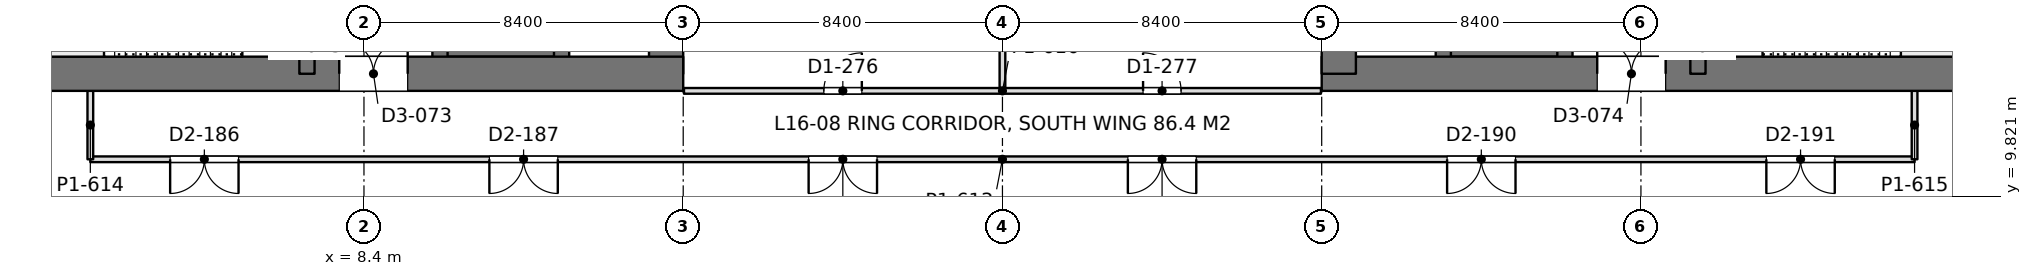
"""IFC4 building model, lengths in metres.
Left out: names, types, materials, properties, quantities, classifications, styles, units other than length and angle.
Written with IfcOpenShell. Run it as: python <this file> out.ifc"""

import sys

from ifc_helpers import new_model, si_unit, direction, frame, frame_2d, origin, place, context, subcontext, project, spatial, rectangle, extrude, element, fill, save


model = new_model("IFC4")
c1 = context("Model", 3, precision=1e-05, world=origin(), true_north=direction((0.0, 1.0)))
c2 = subcontext(c1, "Body", "Model", "MODEL_VIEW")
j1 = project(units=[si_unit("LENGTHUNIT", "METRE"), si_unit("PLANEANGLEUNIT", "RADIAN")], contexts=[c1])
p1 = place(None, origin())
s1 = spatial("IfcSite", under=j1, at=p1, CompositionType="ELEMENT")
p2 = place(p1, origin())
s2 = spatial("IfcBuilding", under=s1, at=p2, CompositionType="ELEMENT")
p3 = place(p2, frame((0.0, 0.0, 72.9)))
s3 = spatial("IfcBuildingStorey", under=s2, at=p3, CompositionType="ELEMENT", Elevation=72.9)
p4 = place(p3, frame((-1.2, 13.05, 0.0), z_axis=(0.0, 0.0, 1.0), x_axis=(1.0, 0.0, 0.0)))
e1 = element("IfcWall", 1, at=p4, inside=s3, PredefinedType="SHEAR", context=c2, shape_type="SweptSolid", body=[
    extrude(rectangle(XDim=18.0, YDim=0.9, at=frame_2d((9.0, 0.0))), origin(), (0.0, 0.0, 1.0), 4.5),
])
p5 = place(p4, frame((8.95, 0.0, 0.0)))
e2 = element("IfcOpeningElement", 2, at=p5, cuts=e1, PredefinedType="OPENING", context=c2, shape_type="SweptSolid", body=[
    extrude(rectangle(XDim=1.8, YDim=2.4, at=frame_2d((0.9, 1.2))), frame((0.0, 0.46, 0.0), z_axis=(0.0, -1.0, 0.0), x_axis=(1.0, 0.0, 0.0)), (0.0, 0.0, 1.0), 0.92),
])
p6 = place(p3, frame((16.35, 13.05, 0.0), z_axis=(0.0, 0.0, 1.0), x_axis=(0.0, 1.0, 0.0)))
e3 = element("IfcWall", 3, at=p6, inside=s3, PredefinedType="SHEAR", context=c2, shape_type="SweptSolid", body=[
    extrude(rectangle(XDim=24.3, YDim=0.9, at=frame_2d((12.15, 0.0))), origin(), (0.0, 0.0, 1.0), 4.5),
])
p7 = place(p3, frame((6.9, 13.05, 0.0), z_axis=(0.0, 0.0, 1.0), x_axis=(0.0, 1.0, 0.0)))
e4 = element("IfcWall", 4, at=p7, inside=s3, PredefinedType="SHEAR", context=c2, shape_type="SweptSolid", body=[
    extrude(rectangle(XDim=24.3, YDim=0.4, at=frame_2d((12.15, 0.0))), origin(), (0.0, 0.0, 1.0), 4.5),
])
p8 = place(p7, frame((1.3, 0.0, 0.0)))
e5 = element("IfcOpeningElement", 5, at=p8, cuts=e4, PredefinedType="OPENING", context=c2, shape_type="SweptSolid", body=[
    extrude(rectangle(XDim=1.0, YDim=2.2, at=frame_2d((0.5, 1.1))), frame((0.0, 0.21, 0.0), z_axis=(0.0, -1.0, 0.0), x_axis=(1.0, 0.0, 0.0)), (0.0, 0.0, 1.0), 0.42),
])
p9 = place(p7, frame((22.0, 0.0, 0.0)))
e6 = element("IfcOpeningElement", 6, at=p9, cuts=e4, PredefinedType="OPENING", context=c2, shape_type="SweptSolid", body=[
    extrude(rectangle(XDim=1.0, YDim=2.2, at=frame_2d((0.5, 1.1))), frame((0.0, 0.21, 0.0), z_axis=(0.0, -1.0, 0.0), x_axis=(1.0, 0.0, 0.0)), (0.0, 0.0, 1.0), 0.42),
])
p10 = place(p7, frame((5.55, 0.0, 0.0)))
e7 = element("IfcOpeningElement", 7, at=p10, cuts=e4, PredefinedType="OPENING", context=c2, shape_type="SweptSolid", body=[
    extrude(rectangle(XDim=1.0, YDim=2.2, at=frame_2d((0.5, 1.1))), frame((0.0, 0.21, 0.0), z_axis=(0.0, -1.0, 0.0), x_axis=(1.0, 0.0, 0.0)), (0.0, 0.0, 1.0), 0.42),
])
p11 = place(p7, frame((9.55, 0.0, 0.0)))
e8 = element("IfcOpeningElement", 8, at=p11, cuts=e4, PredefinedType="OPENING", context=c2, shape_type="SweptSolid", body=[
    extrude(rectangle(XDim=1.0, YDim=2.2, at=frame_2d((0.5, 1.1))), frame((0.0, 0.21, 0.0), z_axis=(0.0, -1.0, 0.0), x_axis=(1.0, 0.0, 0.0)), (0.0, 0.0, 1.0), 0.42),
])
p12 = place(p7, frame((12.8, 0.0, 0.0)))
e9 = element("IfcOpeningElement", 9, at=p12, cuts=e4, PredefinedType="OPENING", context=c2, shape_type="SweptSolid", body=[
    extrude(rectangle(XDim=1.1, YDim=2.2, at=frame_2d((0.55, 1.1))), frame((0.0, 0.21, 0.0), z_axis=(0.0, -1.0, 0.0), x_axis=(1.0, 0.0, 0.0)), (0.0, 0.0, 1.0), 0.42),
])
p13 = place(p7, frame((15.538, 0.0, 0.0)))
e10 = element("IfcOpeningElement", 10, at=p13, cuts=e4, PredefinedType="OPENING", context=c2, shape_type="SweptSolid", body=[
    extrude(rectangle(XDim=1.1, YDim=2.2, at=frame_2d((0.55, 1.1))), frame((0.0, 0.21, 0.0), z_axis=(0.0, -1.0, 0.0), x_axis=(1.0, 0.0, 0.0)), (0.0, 0.0, 1.0), 0.42),
])
p14 = place(p7, frame((18.262, 0.0, 0.0)))
e11 = element("IfcOpeningElement", 11, at=p14, cuts=e4, PredefinedType="OPENING", context=c2, shape_type="SweptSolid", body=[
    extrude(rectangle(XDim=1.1, YDim=2.2, at=frame_2d((0.55, 1.1))), frame((0.0, 0.21, 0.0), z_axis=(0.0, -1.0, 0.0), x_axis=(1.0, 0.0, 0.0)), (0.0, 0.0, 1.0), 0.42),
])
p15 = place(p3, frame((10.4, 13.05, 0.0), z_axis=(0.0, 0.0, 1.0), x_axis=(0.0, 1.0, 0.0)))
e12 = element("IfcWall", 12, at=p15, inside=s3, PredefinedType="SHEAR", context=c2, shape_type="SweptSolid", body=[
    extrude(rectangle(XDim=24.3, YDim=0.4, at=frame_2d((12.15, 0.0))), origin(), (0.0, 0.0, 1.0), 4.5),
])
p16 = place(p15, frame((1.5, 0.0, 0.0)))
e13 = element("IfcOpeningElement", 13, at=p16, cuts=e12, PredefinedType="OPENING", context=c2, shape_type="SweptSolid", body=[
    extrude(rectangle(XDim=1.1, YDim=2.2, at=frame_2d((0.55, 1.1))), frame((0.0, 0.21, 0.0), z_axis=(0.0, -1.0, 0.0), x_axis=(1.0, 0.0, 0.0)), (0.0, 0.0, 1.0), 0.42),
])
p17 = place(p15, frame((4.35, 0.0, 0.0)))
e14 = element("IfcOpeningElement", 14, at=p17, cuts=e12, PredefinedType="OPENING", context=c2, shape_type="SweptSolid", body=[
    extrude(rectangle(XDim=1.1, YDim=2.2, at=frame_2d((0.55, 1.1))), frame((0.0, 0.21, 0.0), z_axis=(0.0, -1.0, 0.0), x_axis=(1.0, 0.0, 0.0)), (0.0, 0.0, 1.0), 0.42),
])
p18 = place(p15, frame((7.2, 0.0, 0.0)))
e15 = element("IfcOpeningElement", 15, at=p18, cuts=e12, PredefinedType="OPENING", context=c2, shape_type="SweptSolid", body=[
    extrude(rectangle(XDim=1.1, YDim=2.2, at=frame_2d((0.55, 1.1))), frame((0.0, 0.21, 0.0), z_axis=(0.0, -1.0, 0.0), x_axis=(1.0, 0.0, 0.0)), (0.0, 0.0, 1.0), 0.42),
])
p19 = place(p15, frame((21.45, 0.0, 0.0)))
e16 = element("IfcOpeningElement", 16, at=p19, cuts=e12, PredefinedType="OPENING", context=c2, shape_type="SweptSolid", body=[
    extrude(rectangle(XDim=1.1, YDim=2.2, at=frame_2d((0.55, 1.1))), frame((0.0, 0.21, 0.0), z_axis=(0.0, -1.0, 0.0), x_axis=(1.0, 0.0, 0.0)), (0.0, 0.0, 1.0), 0.42),
])
p20 = place(p3, frame((13.6, 13.05, 0.0), z_axis=(0.0, 0.0, 1.0), x_axis=(0.0, 1.0, 0.0)))
e17 = element("IfcWall", 17, at=p20, inside=s3, PredefinedType="SHEAR", context=c2, shape_type="SweptSolid", body=[
    extrude(rectangle(XDim=24.3, YDim=0.4, at=frame_2d((12.15, 0.0))), origin(), (0.0, 0.0, 1.0), 4.5),
])
p21 = place(p3, frame((10.4, 13.65, 0.0), z_axis=(0.0, 0.0, 1.0), x_axis=(1.0, 0.0, 0.0)))
e18 = element("IfcWall", 18, at=p21, inside=s3, PredefinedType="SHEAR", context=c2, shape_type="SweptSolid", body=[
    extrude(rectangle(XDim=3.2, YDim=0.3, at=frame_2d((1.6, 0.0))), origin(), (0.0, 0.0, 1.0), 4.5),
])
p22 = place(p3, frame((33.6, 13.05, 0.0), z_axis=(0.0, 0.0, 1.0), x_axis=(1.0, 0.0, 0.0)))
e19 = element("IfcWall", 19, at=p22, inside=s3, PredefinedType="SHEAR", context=c2, shape_type="SweptSolid", body=[
    extrude(rectangle(XDim=18.0, YDim=0.9, at=frame_2d((9.0, 0.0))), origin(), (0.0, 0.0, 1.0), 4.5),
])
p23 = place(p22, frame((7.25, 0.0, 0.0)))
e20 = element("IfcOpeningElement", 20, at=p23, cuts=e19, PredefinedType="OPENING", context=c2, shape_type="SweptSolid", body=[
    extrude(rectangle(XDim=1.8, YDim=2.4, at=frame_2d((0.9, 1.2))), frame((0.0, 0.46, 0.0), z_axis=(0.0, -1.0, 0.0), x_axis=(1.0, 0.0, 0.0)), (0.0, 0.0, 1.0), 0.92),
])
p24 = place(p3, frame((34.05, 13.05, 0.0), z_axis=(0.0, 0.0, 1.0), x_axis=(0.0, 1.0, 0.0)))
e21 = element("IfcWall", 21, at=p24, inside=s3, PredefinedType="SHEAR", context=c2, shape_type="SweptSolid", body=[
    extrude(rectangle(XDim=24.3, YDim=0.9, at=frame_2d((12.15, 0.0))), origin(), (0.0, 0.0, 1.0), 4.5),
])
p25 = place(p3, frame((43.5, 13.05, 0.0), z_axis=(0.0, 0.0, 1.0), x_axis=(0.0, 1.0, 0.0)))
e22 = element("IfcWall", 22, at=p25, inside=s3, PredefinedType="SHEAR", context=c2, shape_type="SweptSolid", body=[
    extrude(rectangle(XDim=24.3, YDim=0.4, at=frame_2d((12.15, 0.0))), origin(), (0.0, 0.0, 1.0), 4.5),
])
p26 = place(p25, frame((1.3, 0.0, 0.0)))
e23 = element("IfcOpeningElement", 23, at=p26, cuts=e22, PredefinedType="OPENING", context=c2, shape_type="SweptSolid", body=[
    extrude(rectangle(XDim=1.0, YDim=2.2, at=frame_2d((0.5, 1.1))), frame((0.0, 0.21, 0.0), z_axis=(0.0, -1.0, 0.0), x_axis=(1.0, 0.0, 0.0)), (0.0, 0.0, 1.0), 0.42),
])
p27 = place(p25, frame((22.0, 0.0, 0.0)))
e24 = element("IfcOpeningElement", 24, at=p27, cuts=e22, PredefinedType="OPENING", context=c2, shape_type="SweptSolid", body=[
    extrude(rectangle(XDim=1.0, YDim=2.2, at=frame_2d((0.5, 1.1))), frame((0.0, 0.21, 0.0), z_axis=(0.0, -1.0, 0.0), x_axis=(1.0, 0.0, 0.0)), (0.0, 0.0, 1.0), 0.42),
])
p28 = place(p25, frame((5.55, 0.0, 0.0)))
e25 = element("IfcOpeningElement", 25, at=p28, cuts=e22, PredefinedType="OPENING", context=c2, shape_type="SweptSolid", body=[
    extrude(rectangle(XDim=1.0, YDim=2.2, at=frame_2d((0.5, 1.1))), frame((0.0, 0.21, 0.0), z_axis=(0.0, -1.0, 0.0), x_axis=(1.0, 0.0, 0.0)), (0.0, 0.0, 1.0), 0.42),
])
p29 = place(p25, frame((9.55, 0.0, 0.0)))
e26 = element("IfcOpeningElement", 26, at=p29, cuts=e22, PredefinedType="OPENING", context=c2, shape_type="SweptSolid", body=[
    extrude(rectangle(XDim=1.0, YDim=2.2, at=frame_2d((0.5, 1.1))), frame((0.0, 0.21, 0.0), z_axis=(0.0, -1.0, 0.0), x_axis=(1.0, 0.0, 0.0)), (0.0, 0.0, 1.0), 0.42),
])
p30 = place(p25, frame((12.8, 0.0, 0.0)))
e27 = element("IfcOpeningElement", 27, at=p30, cuts=e22, PredefinedType="OPENING", context=c2, shape_type="SweptSolid", body=[
    extrude(rectangle(XDim=1.1, YDim=2.2, at=frame_2d((0.55, 1.1))), frame((0.0, 0.21, 0.0), z_axis=(0.0, -1.0, 0.0), x_axis=(1.0, 0.0, 0.0)), (0.0, 0.0, 1.0), 0.42),
])
p31 = place(p25, frame((15.538, 0.0, 0.0)))
e28 = element("IfcOpeningElement", 28, at=p31, cuts=e22, PredefinedType="OPENING", context=c2, shape_type="SweptSolid", body=[
    extrude(rectangle(XDim=1.1, YDim=2.2, at=frame_2d((0.55, 1.1))), frame((0.0, 0.21, 0.0), z_axis=(0.0, -1.0, 0.0), x_axis=(1.0, 0.0, 0.0)), (0.0, 0.0, 1.0), 0.42),
])
p32 = place(p25, frame((18.262, 0.0, 0.0)))
e29 = element("IfcOpeningElement", 29, at=p32, cuts=e22, PredefinedType="OPENING", context=c2, shape_type="SweptSolid", body=[
    extrude(rectangle(XDim=1.1, YDim=2.2, at=frame_2d((0.55, 1.1))), frame((0.0, 0.21, 0.0), z_axis=(0.0, -1.0, 0.0), x_axis=(1.0, 0.0, 0.0)), (0.0, 0.0, 1.0), 0.42),
])
p33 = place(p3, frame((40.0, 13.05, 0.0), z_axis=(0.0, 0.0, 1.0), x_axis=(0.0, 1.0, 0.0)))
e30 = element("IfcWall", 30, at=p33, inside=s3, PredefinedType="SHEAR", context=c2, shape_type="SweptSolid", body=[
    extrude(rectangle(XDim=24.3, YDim=0.4, at=frame_2d((12.15, 0.0))), origin(), (0.0, 0.0, 1.0), 4.5),
])
p34 = place(p33, frame((1.5, 0.0, 0.0)))
e31 = element("IfcOpeningElement", 31, at=p34, cuts=e30, PredefinedType="OPENING", context=c2, shape_type="SweptSolid", body=[
    extrude(rectangle(XDim=1.1, YDim=2.2, at=frame_2d((0.55, 1.1))), frame((0.0, 0.21, 0.0), z_axis=(0.0, -1.0, 0.0), x_axis=(1.0, 0.0, 0.0)), (0.0, 0.0, 1.0), 0.42),
])
p35 = place(p33, frame((4.35, 0.0, 0.0)))
e32 = element("IfcOpeningElement", 32, at=p35, cuts=e30, PredefinedType="OPENING", context=c2, shape_type="SweptSolid", body=[
    extrude(rectangle(XDim=1.1, YDim=2.2, at=frame_2d((0.55, 1.1))), frame((0.0, 0.21, 0.0), z_axis=(0.0, -1.0, 0.0), x_axis=(1.0, 0.0, 0.0)), (0.0, 0.0, 1.0), 0.42),
])
p36 = place(p33, frame((7.2, 0.0, 0.0)))
e33 = element("IfcOpeningElement", 33, at=p36, cuts=e30, PredefinedType="OPENING", context=c2, shape_type="SweptSolid", body=[
    extrude(rectangle(XDim=1.1, YDim=2.2, at=frame_2d((0.55, 1.1))), frame((0.0, 0.21, 0.0), z_axis=(0.0, -1.0, 0.0), x_axis=(1.0, 0.0, 0.0)), (0.0, 0.0, 1.0), 0.42),
])
p37 = place(p33, frame((21.45, 0.0, 0.0)))
e34 = element("IfcOpeningElement", 34, at=p37, cuts=e30, PredefinedType="OPENING", context=c2, shape_type="SweptSolid", body=[
    extrude(rectangle(XDim=1.1, YDim=2.2, at=frame_2d((0.55, 1.1))), frame((0.0, 0.21, 0.0), z_axis=(0.0, -1.0, 0.0), x_axis=(1.0, 0.0, 0.0)), (0.0, 0.0, 1.0), 0.42),
])
p38 = place(p3, frame((36.8, 13.05, 0.0), z_axis=(0.0, 0.0, 1.0), x_axis=(0.0, 1.0, 0.0)))
e35 = element("IfcWall", 35, at=p38, inside=s3, PredefinedType="SHEAR", context=c2, shape_type="SweptSolid", body=[
    extrude(rectangle(XDim=24.3, YDim=0.4, at=frame_2d((12.15, 0.0))), origin(), (0.0, 0.0, 1.0), 4.5),
])
p39 = place(p3, frame((40.0, 13.65, 0.0), z_axis=(0.0, 0.0, 1.0), x_axis=(-1.0, 0.0, 0.0)))
e36 = element("IfcWall", 36, at=p39, inside=s3, PredefinedType="SHEAR", context=c2, shape_type="SweptSolid", body=[
    extrude(rectangle(XDim=3.2, YDim=0.3, at=frame_2d((1.6, 0.0))), origin(), (0.0, 0.0, 1.0), 4.5),
])
p40 = place(p3, frame((1.2, 10.8, 0.0), z_axis=(0.0, 0.0, 1.0), x_axis=(1.0, 0.0, 0.0)))
e37 = element("IfcWall", 37, at=p40, inside=s3, PredefinedType="PARTITIONING", context=c2, shape_type="SweptSolid", body=[
    extrude(rectangle(XDim=48.0, YDim=0.15, at=frame_2d((24.0, 0.0))), origin(), (0.0, 0.0, 1.0), 3.74),
])
p41 = place(p40, frame((2.1, 0.0, 0.0)))
e38 = element("IfcOpeningElement", 38, at=p41, cuts=e37, PredefinedType="OPENING", context=c2, shape_type="SweptSolid", body=[
    extrude(rectangle(XDim=1.8, YDim=2.2, at=frame_2d((0.9, 1.1))), frame((0.0, 0.085, 0.0), z_axis=(0.0, -1.0, 0.0), x_axis=(1.0, 0.0, 0.0)), (0.0, 0.0, 1.0), 0.17),
])
p42 = place(p40, frame((10.5, 0.0, 0.0)))
e39 = element("IfcOpeningElement", 39, at=p42, cuts=e37, PredefinedType="OPENING", context=c2, shape_type="SweptSolid", body=[
    extrude(rectangle(XDim=1.8, YDim=2.2, at=frame_2d((0.9, 1.1))), frame((0.0, 0.085, 0.0), z_axis=(0.0, -1.0, 0.0), x_axis=(1.0, 0.0, 0.0)), (0.0, 0.0, 1.0), 0.17),
])
p43 = place(p40, frame((18.9, 0.0, 0.0)))
e40 = element("IfcOpeningElement", 40, at=p43, cuts=e37, PredefinedType="OPENING", context=c2, shape_type="SweptSolid", body=[
    extrude(rectangle(XDim=1.8, YDim=2.2, at=frame_2d((0.9, 1.1))), frame((0.0, 0.085, 0.0), z_axis=(0.0, -1.0, 0.0), x_axis=(1.0, 0.0, 0.0)), (0.0, 0.0, 1.0), 0.17),
])
p44 = place(p40, frame((27.3, 0.0, 0.0)))
e41 = element("IfcOpeningElement", 41, at=p44, cuts=e37, PredefinedType="OPENING", context=c2, shape_type="SweptSolid", body=[
    extrude(rectangle(XDim=1.8, YDim=2.2, at=frame_2d((0.9, 1.1))), frame((0.0, 0.085, 0.0), z_axis=(0.0, -1.0, 0.0), x_axis=(1.0, 0.0, 0.0)), (0.0, 0.0, 1.0), 0.17),
])
p45 = place(p40, frame((35.7, 0.0, 0.0)))
e42 = element("IfcOpeningElement", 42, at=p45, cuts=e37, PredefinedType="OPENING", context=c2, shape_type="SweptSolid", body=[
    extrude(rectangle(XDim=1.8, YDim=2.2, at=frame_2d((0.9, 1.1))), frame((0.0, 0.085, 0.0), z_axis=(0.0, -1.0, 0.0), x_axis=(1.0, 0.0, 0.0)), (0.0, 0.0, 1.0), 0.17),
])
p46 = place(p40, frame((44.1, 0.0, 0.0)))
e43 = element("IfcOpeningElement", 43, at=p46, cuts=e37, PredefinedType="OPENING", context=c2, shape_type="SweptSolid", body=[
    extrude(rectangle(XDim=1.8, YDim=2.2, at=frame_2d((0.9, 1.1))), frame((0.0, 0.085, 0.0), z_axis=(0.0, -1.0, 0.0), x_axis=(1.0, 0.0, 0.0)), (0.0, 0.0, 1.0), 0.17),
])
for number, where, z_axis, x_axis in (
    (44, (1.2, 10.8, 0.0), (0.0, 0.0, 1.0), (0.0, 1.0, 0.0)),
    (45, (49.2, 10.8, 0.0), (0.0, 0.0, 1.0), (0.0, 1.0, 0.0)),
):
    element("IfcWall", number, at=place(p3, frame(where, z_axis=z_axis, x_axis=x_axis)), inside=s3, PredefinedType="PARTITIONING", context=c2, shape_type="SweptSolid", body=[
        extrude(rectangle(XDim=1.802, YDim=0.15, at=frame_2d((0.901, 0.0))), origin(), (0.0, 0.0, 1.0), 4.34),
    ])
p47 = place(p3, frame((16.82, 12.6, 0.0), z_axis=(0.0, 0.0, 1.0), x_axis=(1.0, 0.0, 0.0)))
e46 = element("IfcWall", 46, at=p47, inside=s3, PredefinedType="PARTITIONING", context=c2, shape_type="SweptSolid", body=[
    extrude(rectangle(XDim=16.76, YDim=0.15, at=frame_2d((8.38, 0.0))), origin(), (0.0, 0.0, 1.0), 3.74),
])
p48 = place(p47, frame((3.68, 0.0, 0.0)))
e47 = element("IfcOpeningElement", 47, at=p48, cuts=e46, PredefinedType="OPENING", context=c2, shape_type="SweptSolid", body=[
    extrude(rectangle(XDim=1.0, YDim=2.2, at=frame_2d((0.5, 1.1))), frame((0.0, 0.085, 0.0), z_axis=(0.0, -1.0, 0.0), x_axis=(1.0, 0.0, 0.0)), (0.0, 0.0, 1.0), 0.17),
])
p49 = place(p47, frame((12.08, 0.0, 0.0)))
e48 = element("IfcOpeningElement", 48, at=p49, cuts=e46, PredefinedType="OPENING", context=c2, shape_type="SweptSolid", body=[
    extrude(rectangle(XDim=1.0, YDim=2.2, at=frame_2d((0.5, 1.1))), frame((0.0, 0.085, 0.0), z_axis=(0.0, -1.0, 0.0), x_axis=(1.0, 0.0, 0.0)), (0.0, 0.0, 1.0), 0.17),
])
p50 = place(p3, frame((25.2, 12.674, 0.0), z_axis=(0.0, 0.0, 1.0), x_axis=(0.0, 1.0, 0.0)))
e49 = element("IfcWall", 49, at=p50, inside=s3, PredefinedType="PARTITIONING", context=c2, shape_type="SweptSolid", body=[
    extrude(rectangle(XDim=3.527, YDim=0.15, at=frame_2d((1.763, 0.0))), origin(), (0.0, 0.0, 1.0), 3.74),
])
p51 = place(p5, origin())
e50 = element("IfcDoor", 50, at=p51, inside=s3, OperationType="DOUBLE_DOOR_SINGLE_SWING", PredefinedType="DOOR", context=c2, shape_type="SweptSolid", body=[
    extrude(rectangle(XDim=1.8, YDim=2.4, at=frame_2d((0.9, 1.2))), frame((0.0, 0.025, 0.0), z_axis=(0.0, -1.0, 0.0), x_axis=(1.0, 0.0, 0.0)), (0.0, 0.0, 1.0), 0.05),
])
fill(e2, e50)
p52 = place(p23, origin())
e51 = element("IfcDoor", 51, at=p52, inside=s3, OperationType="DOUBLE_DOOR_SINGLE_SWING", PredefinedType="DOOR", context=c2, shape_type="SweptSolid", body=[
    extrude(rectangle(XDim=1.8, YDim=2.4, at=frame_2d((0.9, 1.2))), frame((0.0, 0.025, 0.0), z_axis=(0.0, -1.0, 0.0), x_axis=(1.0, 0.0, 0.0)), (0.0, 0.0, 1.0), 0.05),
])
fill(e20, e51)
p53 = place(p41, frame((1.8, 0.0, 0.0), z_axis=(0.0, 0.0, 1.0), x_axis=(-1.0, 0.0, 0.0)))
e52 = element("IfcDoor", 52, at=p53, inside=s3, OperationType="DOUBLE_DOOR_SINGLE_SWING", PredefinedType="DOOR", context=c2, shape_type="SweptSolid", body=[
    extrude(rectangle(XDim=1.8, YDim=2.2, at=frame_2d((0.9, 1.1))), frame((0.0, 0.025, 0.0), z_axis=(0.0, -1.0, 0.0), x_axis=(1.0, 0.0, 0.0)), (0.0, 0.0, 1.0), 0.05),
])
fill(e38, e52)
p54 = place(p42, frame((1.8, 0.0, 0.0), z_axis=(0.0, 0.0, 1.0), x_axis=(-1.0, 0.0, 0.0)))
e53 = element("IfcDoor", 53, at=p54, inside=s3, OperationType="DOUBLE_DOOR_SINGLE_SWING", PredefinedType="DOOR", context=c2, shape_type="SweptSolid", body=[
    extrude(rectangle(XDim=1.8, YDim=2.2, at=frame_2d((0.9, 1.1))), frame((0.0, 0.025, 0.0), z_axis=(0.0, -1.0, 0.0), x_axis=(1.0, 0.0, 0.0)), (0.0, 0.0, 1.0), 0.05),
])
fill(e39, e53)
p55 = place(p43, frame((1.8, 0.0, 0.0), z_axis=(0.0, 0.0, 1.0), x_axis=(-1.0, 0.0, 0.0)))
e54 = element("IfcDoor", 54, at=p55, inside=s3, OperationType="DOUBLE_DOOR_SINGLE_SWING", PredefinedType="DOOR", context=c2, shape_type="SweptSolid", body=[
    extrude(rectangle(XDim=1.8, YDim=2.2, at=frame_2d((0.9, 1.1))), frame((0.0, 0.025, 0.0), z_axis=(0.0, -1.0, 0.0), x_axis=(1.0, 0.0, 0.0)), (0.0, 0.0, 1.0), 0.05),
])
fill(e40, e54)
p56 = place(p44, frame((1.8, 0.0, 0.0), z_axis=(0.0, 0.0, 1.0), x_axis=(-1.0, 0.0, 0.0)))
e55 = element("IfcDoor", 55, at=p56, inside=s3, OperationType="DOUBLE_DOOR_SINGLE_SWING", PredefinedType="DOOR", context=c2, shape_type="SweptSolid", body=[
    extrude(rectangle(XDim=1.8, YDim=2.2, at=frame_2d((0.9, 1.1))), frame((0.0, 0.025, 0.0), z_axis=(0.0, -1.0, 0.0), x_axis=(1.0, 0.0, 0.0)), (0.0, 0.0, 1.0), 0.05),
])
fill(e41, e55)
p57 = place(p45, frame((1.8, 0.0, 0.0), z_axis=(0.0, 0.0, 1.0), x_axis=(-1.0, 0.0, 0.0)))
e56 = element("IfcDoor", 56, at=p57, inside=s3, OperationType="DOUBLE_DOOR_SINGLE_SWING", PredefinedType="DOOR", context=c2, shape_type="SweptSolid", body=[
    extrude(rectangle(XDim=1.8, YDim=2.2, at=frame_2d((0.9, 1.1))), frame((0.0, 0.025, 0.0), z_axis=(0.0, -1.0, 0.0), x_axis=(1.0, 0.0, 0.0)), (0.0, 0.0, 1.0), 0.05),
])
fill(e42, e56)
p58 = place(p46, frame((1.8, 0.0, 0.0), z_axis=(0.0, 0.0, 1.0), x_axis=(-1.0, 0.0, 0.0)))
e57 = element("IfcDoor", 57, at=p58, inside=s3, OperationType="DOUBLE_DOOR_SINGLE_SWING", PredefinedType="DOOR", context=c2, shape_type="SweptSolid", body=[
    extrude(rectangle(XDim=1.8, YDim=2.2, at=frame_2d((0.9, 1.1))), frame((0.0, 0.025, 0.0), z_axis=(0.0, -1.0, 0.0), x_axis=(1.0, 0.0, 0.0)), (0.0, 0.0, 1.0), 0.05),
])
fill(e43, e57)
p59 = place(p48, origin())
e58 = element("IfcDoor", 58, at=p59, inside=s3, OperationType="SINGLE_SWING_RIGHT", PredefinedType="DOOR", context=c2, shape_type="SweptSolid", body=[
    extrude(rectangle(XDim=1.0, YDim=2.2, at=frame_2d((0.5, 1.1))), frame((0.0, 0.025, 0.0), z_axis=(0.0, -1.0, 0.0), x_axis=(1.0, 0.0, 0.0)), (0.0, 0.0, 1.0), 0.05),
])
fill(e47, e58)
p60 = place(p49, origin())
e59 = element("IfcDoor", 59, at=p60, inside=s3, OperationType="SINGLE_SWING_LEFT", PredefinedType="DOOR", context=c2, shape_type="SweptSolid", body=[
    extrude(rectangle(XDim=1.0, YDim=2.2, at=frame_2d((0.5, 1.1))), frame((0.0, 0.025, 0.0), z_axis=(0.0, -1.0, 0.0), x_axis=(1.0, 0.0, 0.0)), (0.0, 0.0, 1.0), 0.05),
])
fill(e48, e59)
save(model, sys.argv[1])
